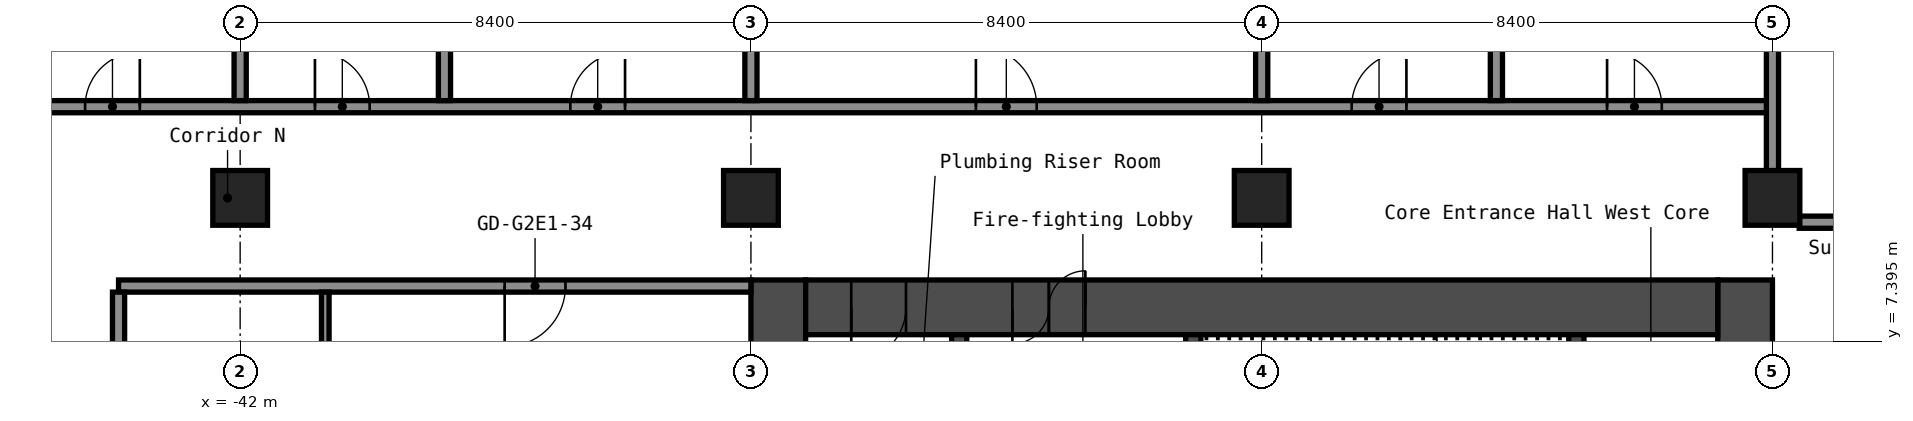
"""IFC4 building model, lengths in metres.
Left out: names, types, materials, properties, quantities, classifications, styles, units other than length and angle.
Written with IfcOpenShell. Run it as: python <this file> out.ifc"""

import sys

from ifc_helpers import new_model, si_unit, direction, frame, frame_2d, origin, origin_2d, place, context, subcontext, project, spatial, rectangle, hollow_rectangle, extrude, element, fill, save


model = new_model("IFC4")
c1 = context("Model", 3, precision=1e-05, world=origin(), true_north=direction((0.0, 1.0)))
c2 = subcontext(c1, "Body", "Model", "MODEL_VIEW")
j1 = project(units=[si_unit("LENGTHUNIT", "METRE"), si_unit("PLANEANGLEUNIT", "RADIAN")], contexts=[c1])
p1 = place(None, origin())
s1 = spatial("IfcSite", under=j1, at=p1, CompositionType="ELEMENT")
p2 = place(p1, origin())
s2 = spatial("IfcBuilding", under=s1, at=p2, CompositionType="ELEMENT")
p3 = place(p2, frame((0.0, 0.0, 104.2)))
s3 = spatial("IfcBuildingStorey", under=s2, at=p3, CompositionType="ELEMENT", Elevation=104.2)
for number, where, z_axis, x_axis in (
    (1, (-42.0, 9.75, 0.0), (0.0, 0.0, 1.0), (1.0, 0.0, 0.0)),
    (2, (-33.6, 9.75, 0.0), (0.0, 0.0, 1.0), (1.0, 0.0, 0.0)),
    (3, (-25.2, 9.75, 0.0), (0.0, 0.0, 1.0), (1.0, 0.0, 0.0)),
    (4, (-16.8, 9.75, 0.0), (0.0, 0.0, 1.0), (1.0, 0.0, 0.0)),
):
    element("IfcColumn", number, at=place(p3, frame(where, z_axis=z_axis, x_axis=x_axis)), inside=s3, PredefinedType="COLUMN", context=c2, shape_type="SweptSolid", body=[
        extrude(hollow_rectangle(XDim=0.9, YDim=0.9, WallThickness=0.036, at=origin_2d()), origin(), (0.0, 0.0, 1.0), 2.8),
    ])
p4 = place(p3, frame((-17.25, -8.4, 0.0), z_axis=(0.0, 0.0, 1.0), x_axis=(0.0, 1.0, 0.0)))
e5 = element("IfcWall", 5, at=p4, inside=s3, PredefinedType="SHEAR", context=c2, shape_type="SweptSolid", body=[
    extrude(rectangle(XDim=16.8, YDim=0.9, at=frame_2d((8.4, 0.0))), origin(), (0.0, 0.0, 1.0), 2.8),
])
p5 = place(p4, frame((7.6, 0.0, 0.0)))
e6 = element("IfcOpeningElement", 6, at=p5, cuts=e5, PredefinedType="OPENING", context=c2, shape_type="SweptSolid", body=[
    extrude(rectangle(XDim=1.2, YDim=2.1, at=frame_2d((0.6, 1.05))), frame((0.0, 0.46, 0.0), z_axis=(0.0, -1.0, 0.0), x_axis=(1.0, 0.0, 0.0)), (0.0, 0.0, 1.0), 0.92),
])
p6 = place(p3, frame((-33.15, -8.4, 0.0), z_axis=(0.0, 0.0, 1.0), x_axis=(0.0, 1.0, 0.0)))
e7 = element("IfcWall", 7, at=p6, inside=s3, PredefinedType="SHEAR", context=c2, shape_type="SweptSolid", body=[
    extrude(rectangle(XDim=16.8, YDim=0.9, at=frame_2d((8.4, 0.0))), origin(), (0.0, 0.0, 1.0), 2.8),
])
p7 = place(p3, frame((-32.7, 7.95, 0.0), z_axis=(0.0, 0.0, 1.0), x_axis=(1.0, 0.0, 0.0)))
e8 = element("IfcWall", 8, at=p7, inside=s3, PredefinedType="SHEAR", context=c2, shape_type="SweptSolid", body=[
    extrude(rectangle(XDim=15.0, YDim=0.9, at=frame_2d((7.5, 0.0))), origin(), (0.0, 0.0, 1.0), 2.8),
])
p8 = place(p7, frame((3.4, 0.0, 0.0)))
e9 = element("IfcOpeningElement", 9, at=p8, cuts=e8, PredefinedType="OPENING", context=c2, shape_type="SweptSolid", body=[
    extrude(rectangle(XDim=1.2, YDim=2.1, at=frame_2d((0.6, 1.05))), frame((0.0, 0.46, 0.0), z_axis=(0.0, -1.0, 0.0), x_axis=(1.0, 0.0, 0.0)), (0.0, 0.0, 1.0), 0.92),
])
p9 = place(p7, frame((0.75, 0.0, 0.0)))
e10 = element("IfcOpeningElement", 10, at=p9, cuts=e8, PredefinedType="OPENING", context=c2, shape_type="SweptSolid", body=[
    extrude(rectangle(XDim=0.9, YDim=2.1, at=frame_2d((0.45, 1.05))), frame((0.0, 0.46, 0.0), z_axis=(0.0, -1.0, 0.0), x_axis=(1.0, 0.0, 0.0)), (0.0, 0.0, 1.0), 0.92),
])
p10 = place(p3, frame((-20.025, 1.2, 0.0), z_axis=(0.0, 0.0, 1.0), x_axis=(0.0, 1.0, 0.0)))
e11 = element("IfcWall", 11, at=p10, inside=s3, PredefinedType="SHEAR", context=c2, shape_type="SweptSolid", body=[
    extrude(rectangle(XDim=6.3, YDim=0.25, at=frame_2d((3.15, 0.0))), origin(), (0.0, 0.0, 1.0), 2.8),
])
p11 = place(p3, frame((-26.325, 3.75, 0.0), z_axis=(0.0, 0.0, 1.0), x_axis=(0.0, 1.0, 0.0)))
e12 = element("IfcWall", 12, at=p11, inside=s3, PredefinedType="SHEAR", context=c2, shape_type="SweptSolid", body=[
    extrude(rectangle(XDim=3.75, YDim=0.25, at=frame_2d((1.875, 0.0))), origin(), (0.0, 0.0, 1.0), 2.8),
])
p12 = place(p11, frame((1.25, 0.0, 0.0)))
e13 = element("IfcOpeningElement", 13, at=p12, cuts=e12, PredefinedType="OPENING", context=c2, shape_type="SweptSolid", body=[
    extrude(rectangle(XDim=1.2, YDim=2.1, at=frame_2d((0.6, 1.05))), frame((0.0, 0.135, 0.0), z_axis=(0.0, -1.0, 0.0), x_axis=(1.0, 0.0, 0.0)), (0.0, 0.0, 1.0), 0.27),
])
p13 = place(p3, frame((-30.175, 1.45, 0.0), z_axis=(0.0, 0.0, 1.0), x_axis=(0.0, 1.0, 0.0)))
e14 = element("IfcWall", 14, at=p13, inside=s3, PredefinedType="SHEAR", context=c2, shape_type="SweptSolid", body=[
    extrude(rectangle(XDim=6.05, YDim=0.25, at=frame_2d((3.025, 0.0))), origin(), (0.0, 0.0, 1.0), 2.8),
])
p14 = place(p13, frame((2.625, 0.0, 0.0)))
e15 = element("IfcOpeningElement", 15, at=p14, cuts=e14, PredefinedType="OPENING", context=c2, shape_type="SweptSolid", body=[
    extrude(rectangle(XDim=1.1, YDim=2.1, at=frame_2d((0.55, 1.05))), frame((0.0, 0.135, 0.0), z_axis=(0.0, -1.0, 0.0), x_axis=(1.0, 0.0, 0.0)), (0.0, 0.0, 1.0), 0.27),
])
p15 = place(p3, frame((-44.0, 8.3, 0.0), z_axis=(0.0, 0.0, 1.0), x_axis=(1.0, 0.0, 0.0)))
e16 = element("IfcWall", 16, at=p15, inside=s3, PredefinedType="PARTITIONING", context=c2, shape_type="SweptSolid", body=[
    extrude(rectangle(XDim=10.4, YDim=0.2, at=frame_2d((5.2, 0.0))), origin(), (0.0, 0.0, 1.0), 2.8),
])
p16 = place(p15, frame((6.35, 0.0, 0.0)))
e17 = element("IfcOpeningElement", 17, at=p16, cuts=e16, PredefinedType="OPENING", context=c2, shape_type="SweptSolid", body=[
    extrude(rectangle(XDim=1.0, YDim=2.1, at=frame_2d((0.5, 1.05))), frame((0.0, 0.11, 0.0), z_axis=(0.0, -1.0, 0.0), x_axis=(1.0, 0.0, 0.0)), (0.0, 0.0, 1.0), 0.22),
])
p17 = place(p3, frame((-16.36, 9.35, 0.0), z_axis=(0.0, 0.0, 1.0), x_axis=(1.0, 0.0, 0.0)))
e18 = element("IfcWall", 18, at=p17, inside=s3, PredefinedType="PARTITIONING", context=c2, shape_type="SweptSolid", body=[
    extrude(rectangle(XDim=32.72, YDim=0.2, at=frame_2d((16.36, 0.0))), origin(), (0.0, 0.0, 1.0), 2.8),
])
p18 = place(p17, frame((5.36, 0.0, 0.0)))
e19 = element("IfcOpeningElement", 19, at=p18, cuts=e18, PredefinedType="OPENING", context=c2, shape_type="SweptSolid", body=[
    extrude(rectangle(XDim=1.0, YDim=2.1, at=frame_2d((0.5, 1.05))), frame((0.0, 0.11, 0.0), z_axis=(0.0, -1.0, 0.0), x_axis=(1.0, 0.0, 0.0)), (0.0, 0.0, 1.0), 0.22),
])
p19 = place(p17, frame((13.76, 0.0, 0.0)))
e20 = element("IfcOpeningElement", 20, at=p19, cuts=e18, PredefinedType="OPENING", context=c2, shape_type="SweptSolid", body=[
    extrude(rectangle(XDim=1.0, YDim=2.1, at=frame_2d((0.5, 1.05))), frame((0.0, 0.11, 0.0), z_axis=(0.0, -1.0, 0.0), x_axis=(1.0, 0.0, 0.0)), (0.0, 0.0, 1.0), 0.22),
])
p20 = place(p17, frame((22.16, 0.0, 0.0)))
e21 = element("IfcOpeningElement", 21, at=p20, cuts=e18, PredefinedType="OPENING", context=c2, shape_type="SweptSolid", body=[
    extrude(rectangle(XDim=1.0, YDim=2.1, at=frame_2d((0.5, 1.05))), frame((0.0, 0.11, 0.0), z_axis=(0.0, -1.0, 0.0), x_axis=(1.0, 0.0, 0.0)), (0.0, 0.0, 1.0), 0.22),
])
p21 = place(p17, frame((26.36, 0.0, 0.0)))
e22 = element("IfcOpeningElement", 22, at=p21, cuts=e18, PredefinedType="OPENING", context=c2, shape_type="SweptSolid", body=[
    extrude(rectangle(XDim=1.0, YDim=2.1, at=frame_2d((0.5, 1.05))), frame((0.0, 0.11, 0.0), z_axis=(0.0, -1.0, 0.0), x_axis=(1.0, 0.0, 0.0)), (0.0, 0.0, 1.0), 0.22),
])
p22 = place(p3, frame((-46.5, 11.25, 0.0), z_axis=(0.0, 0.0, 1.0), x_axis=(1.0, 0.0, 0.0)))
e23 = element("IfcWall", 23, at=p22, inside=s3, PredefinedType="PARTITIONING", context=c2, shape_type="SweptSolid", body=[
    extrude(rectangle(XDim=29.7, YDim=0.2, at=frame_2d((14.85, 0.0))), origin(), (0.0, 0.0, 1.0), 2.8),
])
p23 = place(p22, frame((1.95, 0.0, 0.0)))
e24 = element("IfcOpeningElement", 24, at=p23, cuts=e23, PredefinedType="OPENING", context=c2, shape_type="SweptSolid", body=[
    extrude(rectangle(XDim=0.9, YDim=2.1, at=frame_2d((0.45, 1.05))), frame((0.0, 0.11, 0.0), z_axis=(0.0, -1.0, 0.0), x_axis=(1.0, 0.0, 0.0)), (0.0, 0.0, 1.0), 0.22),
])
p24 = place(p22, frame((5.73, 0.0, 0.0)))
e25 = element("IfcOpeningElement", 25, at=p24, cuts=e23, PredefinedType="OPENING", context=c2, shape_type="SweptSolid", body=[
    extrude(rectangle(XDim=0.9, YDim=2.1, at=frame_2d((0.45, 1.05))), frame((0.0, 0.11, 0.0), z_axis=(0.0, -1.0, 0.0), x_axis=(1.0, 0.0, 0.0)), (0.0, 0.0, 1.0), 0.22),
])
p25 = place(p22, frame((9.93, 0.0, 0.0)))
e26 = element("IfcOpeningElement", 26, at=p25, cuts=e23, PredefinedType="OPENING", context=c2, shape_type="SweptSolid", body=[
    extrude(rectangle(XDim=0.9, YDim=2.1, at=frame_2d((0.45, 1.05))), frame((0.0, 0.11, 0.0), z_axis=(0.0, -1.0, 0.0), x_axis=(1.0, 0.0, 0.0)), (0.0, 0.0, 1.0), 0.22),
])
p26 = place(p22, frame((16.6, 0.0, 0.0)))
e27 = element("IfcOpeningElement", 27, at=p26, cuts=e23, PredefinedType="OPENING", context=c2, shape_type="SweptSolid", body=[
    extrude(rectangle(XDim=1.0, YDim=2.1, at=frame_2d((0.5, 1.05))), frame((0.0, 0.11, 0.0), z_axis=(0.0, -1.0, 0.0), x_axis=(1.0, 0.0, 0.0)), (0.0, 0.0, 1.0), 0.22),
])
p27 = place(p22, frame((22.78, 0.0, 0.0)))
e28 = element("IfcOpeningElement", 28, at=p27, cuts=e23, PredefinedType="OPENING", context=c2, shape_type="SweptSolid", body=[
    extrude(rectangle(XDim=0.9, YDim=2.1, at=frame_2d((0.45, 1.05))), frame((0.0, 0.11, 0.0), z_axis=(0.0, -1.0, 0.0), x_axis=(1.0, 0.0, 0.0)), (0.0, 0.0, 1.0), 0.22),
])
p28 = place(p22, frame((26.98, 0.0, 0.0)))
e29 = element("IfcOpeningElement", 29, at=p28, cuts=e23, PredefinedType="OPENING", context=c2, shape_type="SweptSolid", body=[
    extrude(rectangle(XDim=0.9, YDim=2.1, at=frame_2d((0.45, 1.05))), frame((0.0, 0.11, 0.0), z_axis=(0.0, -1.0, 0.0), x_axis=(1.0, 0.0, 0.0)), (0.0, 0.0, 1.0), 0.22),
])
p29 = place(p3, frame((-44.0, -8.2, 0.0), z_axis=(0.0, 0.0, 1.0), x_axis=(0.0, 1.0, 0.0)))
e30 = element("IfcWall", 30, at=p29, inside=s3, PredefinedType="PARTITIONING", context=c2, shape_type="SweptSolid", body=[
    extrude(rectangle(XDim=16.4, YDim=0.2, at=frame_2d((8.2, 0.0))), origin(), (0.0, 0.0, 1.0), 2.8),
])
p30 = place(p3, frame((-42.0, 11.35, 0.0), z_axis=(0.0, 0.0, 1.0), x_axis=(0.0, 1.0, 0.0)))
e31 = element("IfcWall", 31, at=p30, inside=s3, PredefinedType="PARTITIONING", context=c2, shape_type="SweptSolid", body=[
    extrude(rectangle(XDim=12.2, YDim=0.2, at=frame_2d((6.1, 0.0))), origin(), (0.0, 0.0, 1.0), 2.8),
])
p31 = place(p3, frame((-40.6, 4.9, 0.0), z_axis=(0.0, 0.0, 1.0), x_axis=(0.0, 1.0, 0.0)))
e32 = element("IfcWall", 32, at=p31, inside=s3, PredefinedType="PARTITIONING", context=c2, shape_type="SweptSolid", body=[
    extrude(rectangle(XDim=3.3, YDim=0.125, at=frame_2d((1.65, 0.0))), origin(), (0.0, 0.0, 1.0), 2.8),
])
for number, where, z_axis, x_axis in (
    (33, (-38.64, 11.35, 0.0), (0.0, 0.0, 1.0), (0.0, 1.0, 0.0)),
    (34, (-33.6, 11.35, 0.0), (0.0, 0.0, 1.0), (0.0, 1.0, 0.0)),
    (35, (-25.2, 11.35, 0.0), (0.0, 0.0, 1.0), (0.0, 1.0, 0.0)),
    (36, (-21.34, 11.35, 0.0), (0.0, 0.0, 1.0), (0.0, 1.0, 0.0)),
):
    element("IfcWall", number, at=place(p3, frame(where, z_axis=z_axis, x_axis=x_axis)), inside=s3, PredefinedType="PARTITIONING", context=c2, shape_type="SweptSolid", body=[
        extrude(rectangle(XDim=12.2, YDim=0.2, at=frame_2d((6.1, 0.0))), origin(), (0.0, 0.0, 1.0), 2.8),
    ])
p32 = place(p3, frame((-16.8, 10.19, 0.0), z_axis=(0.0, 0.0, 1.0), x_axis=(0.0, 1.0, 0.0)))
e37 = element("IfcWall", 37, at=p32, inside=s3, PredefinedType="PARTITIONING", context=c2, shape_type="SweptSolid", body=[
    extrude(rectangle(XDim=13.36, YDim=0.2, at=frame_2d((6.68, 0.0))), origin(), (0.0, 0.0, 1.0), 2.8),
])
p33 = place(p8, origin())
e38 = element("IfcDoor", 38, at=p33, inside=s3, OperationType="DOUBLE_DOOR_SINGLE_SWING", PredefinedType="DOOR", context=c2, shape_type="SweptSolid", body=[
    extrude(rectangle(XDim=1.2, YDim=2.1, at=frame_2d((0.6, 1.05))), frame((0.0, 0.025, 0.0), z_axis=(0.0, -1.0, 0.0), x_axis=(1.0, 0.0, 0.0)), (0.0, 0.0, 1.0), 0.05),
])
fill(e9, e38)
p34 = place(p9, origin())
e39 = element("IfcDoor", 39, at=p34, inside=s3, OperationType="SINGLE_SWING_LEFT", PredefinedType="DOOR", context=c2, shape_type="SweptSolid", body=[
    extrude(rectangle(XDim=0.9, YDim=2.1, at=frame_2d((0.45, 1.05))), frame((0.0, 0.025, 0.0), z_axis=(0.0, -1.0, 0.0), x_axis=(1.0, 0.0, 0.0)), (0.0, 0.0, 1.0), 0.05),
])
fill(e10, e39)
p35 = place(p16, origin())
e40 = element("IfcDoor", 40, at=p35, inside=s3, OperationType="SINGLE_SWING_LEFT", PredefinedType="DOOR", context=c2, shape_type="SweptSolid", body=[
    extrude(rectangle(XDim=1.0, YDim=2.1, at=frame_2d((0.5, 1.05))), frame((0.0, 0.025, 0.0), z_axis=(0.0, -1.0, 0.0), x_axis=(1.0, 0.0, 0.0)), (0.0, 0.0, 1.0), 0.05),
])
fill(e17, e40)
p36 = place(p23, origin())
e41 = element("IfcDoor", 41, at=p36, inside=s3, OperationType="SINGLE_SWING_LEFT", PredefinedType="DOOR", context=c2, shape_type="SweptSolid", body=[
    extrude(rectangle(XDim=0.9, YDim=2.1, at=frame_2d((0.45, 1.05))), frame((0.0, 0.025, 0.0), z_axis=(0.0, -1.0, 0.0), x_axis=(1.0, 0.0, 0.0)), (0.0, 0.0, 1.0), 0.05),
])
fill(e24, e41)
p37 = place(p24, origin())
e42 = element("IfcDoor", 42, at=p37, inside=s3, OperationType="SINGLE_SWING_RIGHT", PredefinedType="DOOR", context=c2, shape_type="SweptSolid", body=[
    extrude(rectangle(XDim=0.9, YDim=2.1, at=frame_2d((0.45, 1.05))), frame((0.0, 0.025, 0.0), z_axis=(0.0, -1.0, 0.0), x_axis=(1.0, 0.0, 0.0)), (0.0, 0.0, 1.0), 0.05),
])
fill(e25, e42)
p38 = place(p25, origin())
e43 = element("IfcDoor", 43, at=p38, inside=s3, OperationType="SINGLE_SWING_LEFT", PredefinedType="DOOR", context=c2, shape_type="SweptSolid", body=[
    extrude(rectangle(XDim=0.9, YDim=2.1, at=frame_2d((0.45, 1.05))), frame((0.0, 0.025, 0.0), z_axis=(0.0, -1.0, 0.0), x_axis=(1.0, 0.0, 0.0)), (0.0, 0.0, 1.0), 0.05),
])
fill(e26, e43)
p39 = place(p26, origin())
e44 = element("IfcDoor", 44, at=p39, inside=s3, OperationType="SINGLE_SWING_RIGHT", PredefinedType="DOOR", context=c2, shape_type="SweptSolid", body=[
    extrude(rectangle(XDim=1.0, YDim=2.1, at=frame_2d((0.5, 1.05))), frame((0.0, 0.025, 0.0), z_axis=(0.0, -1.0, 0.0), x_axis=(1.0, 0.0, 0.0)), (0.0, 0.0, 1.0), 0.05),
])
fill(e27, e44)
p40 = place(p27, origin())
e45 = element("IfcDoor", 45, at=p40, inside=s3, OperationType="SINGLE_SWING_LEFT", PredefinedType="DOOR", context=c2, shape_type="SweptSolid", body=[
    extrude(rectangle(XDim=0.9, YDim=2.1, at=frame_2d((0.45, 1.05))), frame((0.0, 0.025, 0.0), z_axis=(0.0, -1.0, 0.0), x_axis=(1.0, 0.0, 0.0)), (0.0, 0.0, 1.0), 0.05),
])
fill(e28, e45)
p41 = place(p28, origin())
e46 = element("IfcDoor", 46, at=p41, inside=s3, OperationType="SINGLE_SWING_RIGHT", PredefinedType="DOOR", context=c2, shape_type="SweptSolid", body=[
    extrude(rectangle(XDim=0.9, YDim=2.1, at=frame_2d((0.45, 1.05))), frame((0.0, 0.025, 0.0), z_axis=(0.0, -1.0, 0.0), x_axis=(1.0, 0.0, 0.0)), (0.0, 0.0, 1.0), 0.05),
])
fill(e29, e46)
save(model, sys.argv[1])
